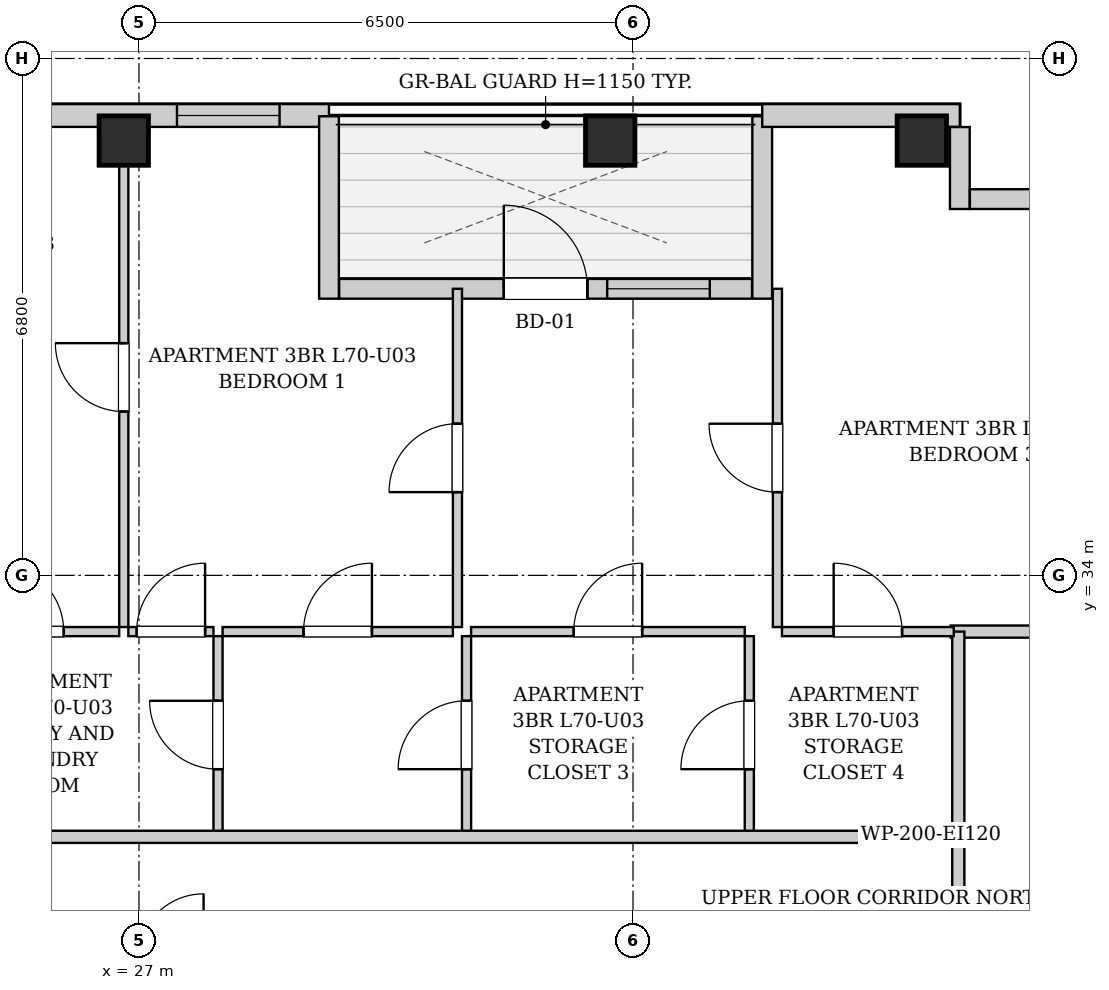
"""IFC4 building model, lengths in metres.
Left out: names, types, materials, properties, quantities, classifications, styles, units other than length and angle.
Written with IfcOpenShell. Run it as: python <this file> out.ifc"""

import sys

from ifc_helpers import new_model, si_unit, direction, frame, frame_2d, origin, origin_2d, place, context, subcontext, project, spatial, rectangle, extrude, element, fill, save


model = new_model("IFC4")
c1 = context("Model", 3, precision=1e-05, world=origin(), true_north=direction((0.0, 1.0)))
c2 = subcontext(c1, "Body", "Model", "MODEL_VIEW")
j1 = project(units=[si_unit("LENGTHUNIT", "METRE"), si_unit("PLANEANGLEUNIT", "RADIAN")], contexts=[c1])
p1 = place(None, origin())
s1 = spatial("IfcSite", under=j1, at=p1, CompositionType="ELEMENT")
p2 = place(p1, origin())
s2 = spatial("IfcBuilding", under=s1, at=p2, CompositionType="ELEMENT")
p3 = place(p2, frame((0.0, 0.0, 241.1)))
s3 = spatial("IfcBuildingStorey", under=s2, at=p3, CompositionType="ELEMENT", Elevation=241.1)
for number, where, z_axis, x_axis in (
    (1, (26.8, 39.72, 0.0), (0.0, 0.0, 1.0), (1.0, 0.0, 0.0)),
    (2, (33.2, 39.72, 0.0), (0.0, 0.0, 1.0), (1.0, 0.0, 0.0)),
    (3, (37.3, 39.72, 0.0), (0.0, 0.0, 1.0), (1.0, 0.0, 0.0)),
):
    element("IfcColumn", number, at=place(p3, frame(where, z_axis=z_axis, x_axis=x_axis)), inside=s3, PredefinedType="COLUMN", context=c2, shape_type="SweptSolid", body=[
        extrude(rectangle(XDim=0.65, YDim=0.65, at=origin_2d()), origin(), (0.0, 0.0, 1.0), 3.4),
    ])
p4 = place(p3, frame((13.1, 40.05, 0.0), z_axis=(0.0, 0.0, 1.0), x_axis=(1.0, 0.0, 0.0)))
e4 = element("IfcWall", 4, at=p4, inside=s3, PredefinedType="SOLIDWALL", context=c2, shape_type="SweptSolid", body=[
    extrude(rectangle(XDim=16.4, YDim=0.3, at=frame_2d((8.2, 0.0))), origin(), (0.0, 0.0, 1.0), 3.14),
])
p5 = place(p4, frame((1.808, 0.0, 0.55)))
e5 = element("IfcOpeningElement", 5, at=p5, cuts=e4, PredefinedType="OPENING", context=c2, shape_type="SweptSolid", body=[
    extrude(rectangle(XDim=1.35, YDim=1.2, at=frame_2d((0.675, 0.6))), frame((0.0, 0.16, 0.0), z_axis=(0.0, -1.0, 0.0), x_axis=(1.0, 0.0, 0.0)), (0.0, 0.0, 1.0), 0.32),
])
p6 = place(p4, frame((6.246, 0.0, 0.55)))
e6 = element("IfcOpeningElement", 6, at=p6, cuts=e4, PredefinedType="OPENING", context=c2, shape_type="SweptSolid", body=[
    extrude(rectangle(XDim=1.35, YDim=1.2, at=frame_2d((0.675, 0.6))), frame((0.0, 0.16, 0.0), z_axis=(0.0, -1.0, 0.0), x_axis=(1.0, 0.0, 0.0)), (0.0, 0.0, 1.0), 0.32),
])
p7 = place(p4, frame((14.4, 0.0, 0.55)))
e7 = element("IfcOpeningElement", 7, at=p7, cuts=e4, PredefinedType="OPENING", context=c2, shape_type="SweptSolid", body=[
    extrude(rectangle(XDim=1.35, YDim=1.2, at=frame_2d((0.675, 0.6))), frame((0.0, 0.16, 0.0), z_axis=(0.0, -1.0, 0.0), x_axis=(1.0, 0.0, 0.0)), (0.0, 0.0, 1.0), 0.32),
])
p8 = place(p3, frame((29.5, 40.04, 0.0), z_axis=(0.0, 0.0, 1.0), x_axis=(0.0, -1.0, 0.0)))
e8 = element("IfcWall", 8, at=p8, inside=s3, PredefinedType="SOLIDWALL", context=c2, shape_type="SweptSolid", body=[
    extrude(rectangle(XDim=2.4, YDim=0.26, at=frame_2d((1.2, 0.0))), origin(), (0.0, 0.0, 1.0), 3.14),
])
p9 = place(p3, frame((29.634, 37.77, 0.0), z_axis=(0.0, 0.0, 1.0), x_axis=(1.0, 0.0, 0.0)))
e9 = element("IfcWall", 9, at=p9, inside=s3, PredefinedType="SOLIDWALL", context=c2, shape_type="SweptSolid", body=[
    extrude(rectangle(XDim=5.432, YDim=0.26, at=frame_2d((2.716, 0.0))), origin(), (0.0, 0.0, 1.0), 3.14),
])
p10 = place(p9, frame((2.166, 0.0, 0.0)))
e10 = element("IfcOpeningElement", 10, at=p10, cuts=e9, PredefinedType="OPENING", context=c2, shape_type="SweptSolid", body=[
    extrude(rectangle(XDim=1.1, YDim=2.0, at=frame_2d((0.55, 1.0))), frame((0.0, 0.14, 0.0), z_axis=(0.0, -1.0, 0.0), x_axis=(1.0, 0.0, 0.0)), (0.0, 0.0, 1.0), 0.28),
])
p11 = place(p9, frame((3.526, 0.0, 0.55)))
e11 = element("IfcOpeningElement", 11, at=p11, cuts=e9, PredefinedType="OPENING", context=c2, shape_type="SweptSolid", body=[
    extrude(rectangle(XDim=1.35, YDim=1.2, at=frame_2d((0.675, 0.6))), frame((0.0, 0.14, 0.0), z_axis=(0.0, -1.0, 0.0), x_axis=(1.0, 0.0, 0.0)), (0.0, 0.0, 1.0), 0.28),
])
p12 = place(p3, frame((35.2, 37.64, 0.0), z_axis=(0.0, 0.0, 1.0), x_axis=(0.0, 1.0, 0.0)))
e12 = element("IfcWall", 12, at=p12, inside=s3, PredefinedType="SOLIDWALL", context=c2, shape_type="SweptSolid", body=[
    extrude(rectangle(XDim=2.4, YDim=0.26, at=frame_2d((1.2, 0.0))), origin(), (0.0, 0.0, 1.0), 3.14),
])
p13 = place(p3, frame((35.2, 40.05, 0.0), z_axis=(0.0, 0.0, 1.0), x_axis=(1.0, 0.0, 0.0)))
e13 = element("IfcWall", 13, at=p13, inside=s3, PredefinedType="SOLIDWALL", context=c2, shape_type="SweptSolid", body=[
    extrude(rectangle(XDim=2.6, YDim=0.3, at=frame_2d((1.3, 0.0))), origin(), (0.0, 0.0, 1.0), 3.14),
])
p14 = place(p3, frame((37.8, 39.898, 0.0), z_axis=(0.0, 0.0, 1.0), x_axis=(0.0, -1.0, 0.0)))
e14 = element("IfcWall", 14, at=p14, inside=s3, PredefinedType="SOLIDWALL", context=c2, shape_type="SweptSolid", body=[
    extrude(rectangle(XDim=1.078, YDim=0.26, at=frame_2d((0.539, 0.0))), origin(), (0.0, 0.0, 1.0), 3.14),
])
p15 = place(p3, frame((37.932, 38.95, 0.0), z_axis=(0.0, 0.0, 1.0), x_axis=(1.0, 0.0, 0.0)))
e15 = element("IfcWall", 15, at=p15, inside=s3, PredefinedType="SOLIDWALL", context=c2, shape_type="SweptSolid", body=[
    extrude(rectangle(XDim=1.248, YDim=0.26, at=frame_2d((0.624, 0.0))), origin(), (0.0, 0.0, 1.0), 3.14),
])
p16 = place(p3, frame((37.78, 28.98, 0.0), z_axis=(0.0, 0.0, 1.0), x_axis=(0.0, 1.0, 0.0)))
e16 = element("IfcWall", 16, at=p16, inside=s3, PredefinedType="PARTITIONING", context=c2, shape_type="SweptSolid", body=[
    extrude(rectangle(XDim=1.58, YDim=0.16, at=frame_2d((0.79, 0.0))), origin(), (0.0, 0.0, 1.0), 3.14),
])
p17 = place(p3, frame((37.68, 33.26, 0.0), z_axis=(0.0, 0.0, 1.0), x_axis=(1.0, 0.0, 0.0)))
e17 = element("IfcWall", 17, at=p17, inside=s3, PredefinedType="PARTITIONING", context=c2, shape_type="SweptSolid", body=[
    extrude(rectangle(XDim=2.34, YDim=0.16, at=frame_2d((1.17, 0.0))), origin(), (0.0, 0.0, 1.0), 3.14),
])
p18 = place(p3, frame((37.78, 30.6, 0.0), z_axis=(0.0, 0.0, 1.0), x_axis=(0.0, 1.0, 0.0)))
e18 = element("IfcWall", 18, at=p18, inside=s3, PredefinedType="PARTITIONING", context=c2, shape_type="SweptSolid", body=[
    extrude(rectangle(XDim=2.66, YDim=0.16, at=frame_2d((1.33, 0.0))), origin(), (0.0, 0.0, 1.0), 3.14),
])
p19 = place(p3, frame((28.04, 30.6, 0.0), z_axis=(0.0, 0.0, 1.0), x_axis=(0.0, 1.0, 0.0)))
e19 = element("IfcWall", 19, at=p19, inside=s3, PredefinedType="PARTITIONING", context=c2, shape_type="SweptSolid", body=[
    extrude(rectangle(XDim=2.6, YDim=0.12, at=frame_2d((1.3, 0.0))), origin(), (0.0, 0.0, 1.0), 3.14),
])
p20 = place(p19, frame((0.85, 0.0, 0.0)))
e20 = element("IfcOpeningElement", 20, at=p20, cuts=e19, PredefinedType="OPENING", context=c2, shape_type="SweptSolid", body=[
    extrude(rectangle(XDim=0.9, YDim=2.05, at=frame_2d((0.45, 1.025))), frame((0.0, 0.07, 0.0), z_axis=(0.0, -1.0, 0.0), x_axis=(1.0, 0.0, 0.0)), (0.0, 0.0, 1.0), 0.14),
])
p21 = place(p3, frame((24.38, 33.26, 0.0), z_axis=(0.0, 0.0, 1.0), x_axis=(1.0, 0.0, 0.0)))
e21 = element("IfcWall", 21, at=p21, inside=s3, PredefinedType="PARTITIONING", context=c2, shape_type="SweptSolid", body=[
    extrude(rectangle(XDim=2.36, YDim=0.12, at=frame_2d((1.18, 0.0))), origin(), (0.0, 0.0, 1.0), 3.14),
])
p22 = place(p21, frame((0.73, 0.0, 0.0)))
e22 = element("IfcOpeningElement", 22, at=p22, cuts=e21, PredefinedType="OPENING", context=c2, shape_type="SweptSolid", body=[
    extrude(rectangle(XDim=0.9, YDim=2.05, at=frame_2d((0.45, 1.025))), frame((0.0, 0.07, 0.0), z_axis=(0.0, -1.0, 0.0), x_axis=(1.0, 0.0, 0.0)), (0.0, 0.0, 1.0), 0.14),
])
p23 = place(p3, frame((26.86, 33.26, 0.0), z_axis=(0.0, 0.0, 1.0), x_axis=(1.0, 0.0, 0.0)))
e23 = element("IfcWall", 23, at=p23, inside=s3, PredefinedType="PARTITIONING", context=c2, shape_type="SweptSolid", body=[
    extrude(rectangle(XDim=1.12, YDim=0.12, at=frame_2d((0.56, 0.0))), origin(), (0.0, 0.0, 1.0), 3.14),
])
p24 = place(p23, frame((0.11, 0.0, 0.0)))
e24 = element("IfcOpeningElement", 24, at=p24, cuts=e23, PredefinedType="OPENING", context=c2, shape_type="SweptSolid", body=[
    extrude(rectangle(XDim=0.9, YDim=2.05, at=frame_2d((0.45, 1.025))), frame((0.0, 0.07, 0.0), z_axis=(0.0, -1.0, 0.0), x_axis=(1.0, 0.0, 0.0)), (0.0, 0.0, 1.0), 0.14),
])
p25 = place(p3, frame((31.31, 30.6, 0.0), z_axis=(0.0, 0.0, 1.0), x_axis=(0.0, 1.0, 0.0)))
e25 = element("IfcWall", 25, at=p25, inside=s3, PredefinedType="PARTITIONING", context=c2, shape_type="SweptSolid", body=[
    extrude(rectangle(XDim=2.6, YDim=0.12, at=frame_2d((1.3, 0.0))), origin(), (0.0, 0.0, 1.0), 3.14),
])
p26 = place(p25, frame((0.85, 0.0, 0.0)))
e26 = element("IfcOpeningElement", 26, at=p26, cuts=e25, PredefinedType="OPENING", context=c2, shape_type="SweptSolid", body=[
    extrude(rectangle(XDim=0.9, YDim=2.05, at=frame_2d((0.45, 1.025))), frame((0.0, 0.07, 0.0), z_axis=(0.0, -1.0, 0.0), x_axis=(1.0, 0.0, 0.0)), (0.0, 0.0, 1.0), 0.14),
])
p27 = place(p3, frame((28.1, 33.26, 0.0), z_axis=(0.0, 0.0, 1.0), x_axis=(1.0, 0.0, 0.0)))
e27 = element("IfcWall", 27, at=p27, inside=s3, PredefinedType="PARTITIONING", context=c2, shape_type="SweptSolid", body=[
    extrude(rectangle(XDim=3.03, YDim=0.12, at=frame_2d((1.515, 0.0))), origin(), (0.0, 0.0, 1.0), 3.14),
])
p28 = place(p27, frame((1.065, 0.0, 0.0)))
e28 = element("IfcOpeningElement", 28, at=p28, cuts=e27, PredefinedType="OPENING", context=c2, shape_type="SweptSolid", body=[
    extrude(rectangle(XDim=0.9, YDim=2.05, at=frame_2d((0.45, 1.025))), frame((0.0, 0.07, 0.0), z_axis=(0.0, -1.0, 0.0), x_axis=(1.0, 0.0, 0.0)), (0.0, 0.0, 1.0), 0.14),
])
p29 = place(p3, frame((35.03, 30.6, 0.0), z_axis=(0.0, 0.0, 1.0), x_axis=(0.0, 1.0, 0.0)))
e29 = element("IfcWall", 29, at=p29, inside=s3, PredefinedType="PARTITIONING", context=c2, shape_type="SweptSolid", body=[
    extrude(rectangle(XDim=2.6, YDim=0.12, at=frame_2d((1.3, 0.0))), origin(), (0.0, 0.0, 1.0), 3.14),
])
p30 = place(p29, frame((0.85, 0.0, 0.0)))
e30 = element("IfcOpeningElement", 30, at=p30, cuts=e29, PredefinedType="OPENING", context=c2, shape_type="SweptSolid", body=[
    extrude(rectangle(XDim=0.9, YDim=2.05, at=frame_2d((0.45, 1.025))), frame((0.0, 0.07, 0.0), z_axis=(0.0, -1.0, 0.0), x_axis=(1.0, 0.0, 0.0)), (0.0, 0.0, 1.0), 0.14),
])
p31 = place(p3, frame((31.37, 33.26, 0.0), z_axis=(0.0, 0.0, 1.0), x_axis=(1.0, 0.0, 0.0)))
e31 = element("IfcWall", 31, at=p31, inside=s3, PredefinedType="PARTITIONING", context=c2, shape_type="SweptSolid", body=[
    extrude(rectangle(XDim=3.6, YDim=0.12, at=frame_2d((1.8, 0.0))), origin(), (0.0, 0.0, 1.0), 3.14),
])
p32 = place(p31, frame((1.35, 0.0, 0.0)))
e32 = element("IfcOpeningElement", 32, at=p32, cuts=e31, PredefinedType="OPENING", context=c2, shape_type="SweptSolid", body=[
    extrude(rectangle(XDim=0.9, YDim=2.05, at=frame_2d((0.45, 1.025))), frame((0.0, 0.07, 0.0), z_axis=(0.0, -1.0, 0.0), x_axis=(1.0, 0.0, 0.0)), (0.0, 0.0, 1.0), 0.14),
])
p33 = place(p3, frame((35.46, 33.26, 0.0), z_axis=(0.0, 0.0, 1.0), x_axis=(1.0, 0.0, 0.0)))
e33 = element("IfcWall", 33, at=p33, inside=s3, PredefinedType="PARTITIONING", context=c2, shape_type="SweptSolid", body=[
    extrude(rectangle(XDim=2.26, YDim=0.12, at=frame_2d((1.13, 0.0))), origin(), (0.0, 0.0, 1.0), 3.14),
])
p34 = place(p33, frame((0.68, 0.0, 0.0)))
e34 = element("IfcOpeningElement", 34, at=p34, cuts=e33, PredefinedType="OPENING", context=c2, shape_type="SweptSolid", body=[
    extrude(rectangle(XDim=0.9, YDim=2.05, at=frame_2d((0.45, 1.025))), frame((0.0, 0.07, 0.0), z_axis=(0.0, -1.0, 0.0), x_axis=(1.0, 0.0, 0.0)), (0.0, 0.0, 1.0), 0.14),
])
p35 = place(p3, frame((26.8, 33.32, 0.0), z_axis=(0.0, 0.0, 1.0), x_axis=(0.0, 1.0, 0.0)))
e35 = element("IfcWall", 35, at=p35, inside=s3, PredefinedType="PARTITIONING", context=c2, shape_type="SweptSolid", body=[
    extrude(rectangle(XDim=6.6, YDim=0.12, at=frame_2d((3.3, 0.0))), origin(), (0.0, 0.0, 1.0), 3.14),
])
p36 = place(p35, frame((2.835, 0.0, 0.0)))
e36 = element("IfcOpeningElement", 36, at=p36, cuts=e35, PredefinedType="OPENING", context=c2, shape_type="SweptSolid", body=[
    extrude(rectangle(XDim=0.9, YDim=2.05, at=frame_2d((0.45, 1.025))), frame((0.0, 0.07, 0.0), z_axis=(0.0, -1.0, 0.0), x_axis=(1.0, 0.0, 0.0)), (0.0, 0.0, 1.0), 0.14),
])
p37 = place(p3, frame((31.19, 33.32, 0.0), z_axis=(0.0, 0.0, 1.0), x_axis=(0.0, 1.0, 0.0)))
e37 = element("IfcWall", 37, at=p37, inside=s3, PredefinedType="PARTITIONING", context=c2, shape_type="SweptSolid", body=[
    extrude(rectangle(XDim=4.45, YDim=0.12, at=frame_2d((2.225, 0.0))), origin(), (0.0, 0.0, 1.0), 3.14),
])
p38 = place(p37, frame((1.775, 0.0, 0.0)))
e38 = element("IfcOpeningElement", 38, at=p38, cuts=e37, PredefinedType="OPENING", context=c2, shape_type="SweptSolid", body=[
    extrude(rectangle(XDim=0.9, YDim=2.05, at=frame_2d((0.45, 1.025))), frame((0.0, 0.07, 0.0), z_axis=(0.0, -1.0, 0.0), x_axis=(1.0, 0.0, 0.0)), (0.0, 0.0, 1.0), 0.14),
])
p39 = place(p3, frame((35.4, 33.32, 0.0), z_axis=(0.0, 0.0, 1.0), x_axis=(0.0, 1.0, 0.0)))
e39 = element("IfcWall", 39, at=p39, inside=s3, PredefinedType="PARTITIONING", context=c2, shape_type="SweptSolid", body=[
    extrude(rectangle(XDim=4.45, YDim=0.12, at=frame_2d((2.225, 0.0))), origin(), (0.0, 0.0, 1.0), 3.14),
])
p40 = place(p39, frame((1.775, 0.0, 0.0)))
e40 = element("IfcOpeningElement", 40, at=p40, cuts=e39, PredefinedType="OPENING", context=c2, shape_type="SweptSolid", body=[
    extrude(rectangle(XDim=0.9, YDim=2.05, at=frame_2d((0.45, 1.025))), frame((0.0, 0.07, 0.0), z_axis=(0.0, -1.0, 0.0), x_axis=(1.0, 0.0, 0.0)), (0.0, 0.0, 1.0), 0.14),
])
p41 = place(p3, frame((13.15, 30.56, 0.0), z_axis=(0.0, 0.0, 1.0), x_axis=(1.0, 0.0, 0.0)))
e41 = element("IfcWall", 41, at=p41, inside=s3, PredefinedType="PARTITIONING", context=c2, shape_type="SweptSolid", body=[
    extrude(rectangle(XDim=24.6, YDim=0.16, at=frame_2d((12.3, 0.0))), origin(), (0.0, 0.0, 1.0), 3.14),
])
p42 = place(p41, frame((3.165, 0.0, 0.0)))
e42 = element("IfcOpeningElement", 42, at=p42, cuts=e41, PredefinedType="OPENING", context=c2, shape_type="SweptSolid", body=[
    extrude(rectangle(XDim=0.95, YDim=2.1, at=frame_2d((0.475, 1.05))), frame((0.0, 0.09, 0.0), z_axis=(0.0, -1.0, 0.0), x_axis=(1.0, 0.0, 0.0)), (0.0, 0.0, 1.0), 0.18),
])
p43 = place(p20, origin())
e43 = element("IfcDoor", 43, at=p43, inside=s3, OperationType="SINGLE_SWING_RIGHT", PredefinedType="DOOR", context=c2, shape_type="SweptSolid", body=[
    extrude(rectangle(XDim=0.9, YDim=2.05, at=frame_2d((0.45, 1.025))), frame((0.0, 0.025, 0.0), z_axis=(0.0, -1.0, 0.0), x_axis=(1.0, 0.0, 0.0)), (0.0, 0.0, 1.0), 0.05),
])
fill(e20, e43)
p44 = place(p22, origin())
e44 = element("IfcDoor", 44, at=p44, inside=s3, OperationType="SINGLE_SWING_LEFT", PredefinedType="DOOR", context=c2, shape_type="SweptSolid", body=[
    extrude(rectangle(XDim=0.9, YDim=2.05, at=frame_2d((0.45, 1.025))), frame((0.0, 0.025, 0.0), z_axis=(0.0, -1.0, 0.0), x_axis=(1.0, 0.0, 0.0)), (0.0, 0.0, 1.0), 0.05),
])
fill(e22, e44)
p45 = place(p24, origin())
e45 = element("IfcDoor", 45, at=p45, inside=s3, OperationType="SINGLE_SWING_RIGHT", PredefinedType="DOOR", context=c2, shape_type="SweptSolid", body=[
    extrude(rectangle(XDim=0.9, YDim=2.05, at=frame_2d((0.45, 1.025))), frame((0.0, 0.025, 0.0), z_axis=(0.0, -1.0, 0.0), x_axis=(1.0, 0.0, 0.0)), (0.0, 0.0, 1.0), 0.05),
])
fill(e24, e45)
p46 = place(p26, origin())
e46 = element("IfcDoor", 46, at=p46, inside=s3, OperationType="SINGLE_SWING_LEFT", PredefinedType="DOOR", context=c2, shape_type="SweptSolid", body=[
    extrude(rectangle(XDim=0.9, YDim=2.05, at=frame_2d((0.45, 1.025))), frame((0.0, 0.025, 0.0), z_axis=(0.0, -1.0, 0.0), x_axis=(1.0, 0.0, 0.0)), (0.0, 0.0, 1.0), 0.05),
])
fill(e26, e46)
p47 = place(p28, origin())
e47 = element("IfcDoor", 47, at=p47, inside=s3, OperationType="SINGLE_SWING_RIGHT", PredefinedType="DOOR", context=c2, shape_type="SweptSolid", body=[
    extrude(rectangle(XDim=0.9, YDim=2.05, at=frame_2d((0.45, 1.025))), frame((0.0, 0.025, 0.0), z_axis=(0.0, -1.0, 0.0), x_axis=(1.0, 0.0, 0.0)), (0.0, 0.0, 1.0), 0.05),
])
fill(e28, e47)
p48 = place(p30, origin())
e48 = element("IfcDoor", 48, at=p48, inside=s3, OperationType="SINGLE_SWING_LEFT", PredefinedType="DOOR", context=c2, shape_type="SweptSolid", body=[
    extrude(rectangle(XDim=0.9, YDim=2.05, at=frame_2d((0.45, 1.025))), frame((0.0, 0.025, 0.0), z_axis=(0.0, -1.0, 0.0), x_axis=(1.0, 0.0, 0.0)), (0.0, 0.0, 1.0), 0.05),
])
fill(e30, e48)
p49 = place(p32, origin())
e49 = element("IfcDoor", 49, at=p49, inside=s3, OperationType="SINGLE_SWING_RIGHT", PredefinedType="DOOR", context=c2, shape_type="SweptSolid", body=[
    extrude(rectangle(XDim=0.9, YDim=2.05, at=frame_2d((0.45, 1.025))), frame((0.0, 0.025, 0.0), z_axis=(0.0, -1.0, 0.0), x_axis=(1.0, 0.0, 0.0)), (0.0, 0.0, 1.0), 0.05),
])
fill(e32, e49)
p50 = place(p34, origin())
e50 = element("IfcDoor", 50, at=p50, inside=s3, OperationType="SINGLE_SWING_LEFT", PredefinedType="DOOR", context=c2, shape_type="SweptSolid", body=[
    extrude(rectangle(XDim=0.9, YDim=2.05, at=frame_2d((0.45, 1.025))), frame((0.0, 0.025, 0.0), z_axis=(0.0, -1.0, 0.0), x_axis=(1.0, 0.0, 0.0)), (0.0, 0.0, 1.0), 0.05),
])
fill(e34, e50)
p51 = place(p36, origin())
e51 = element("IfcDoor", 51, at=p51, inside=s3, OperationType="SINGLE_SWING_RIGHT", PredefinedType="DOOR", context=c2, shape_type="SweptSolid", body=[
    extrude(rectangle(XDim=0.9, YDim=2.05, at=frame_2d((0.45, 1.025))), frame((0.0, 0.025, 0.0), z_axis=(0.0, -1.0, 0.0), x_axis=(1.0, 0.0, 0.0)), (0.0, 0.0, 1.0), 0.05),
])
fill(e36, e51)
p52 = place(p38, origin())
e52 = element("IfcDoor", 52, at=p52, inside=s3, OperationType="SINGLE_SWING_LEFT", PredefinedType="DOOR", context=c2, shape_type="SweptSolid", body=[
    extrude(rectangle(XDim=0.9, YDim=2.05, at=frame_2d((0.45, 1.025))), frame((0.0, 0.025, 0.0), z_axis=(0.0, -1.0, 0.0), x_axis=(1.0, 0.0, 0.0)), (0.0, 0.0, 1.0), 0.05),
])
fill(e38, e52)
p53 = place(p40, origin())
e53 = element("IfcDoor", 53, at=p53, inside=s3, OperationType="SINGLE_SWING_RIGHT", PredefinedType="DOOR", context=c2, shape_type="SweptSolid", body=[
    extrude(rectangle(XDim=0.9, YDim=2.05, at=frame_2d((0.45, 1.025))), frame((0.0, 0.025, 0.0), z_axis=(0.0, -1.0, 0.0), x_axis=(1.0, 0.0, 0.0)), (0.0, 0.0, 1.0), 0.05),
])
fill(e40, e53)
p54 = place(p10, origin())
e54 = element("IfcDoor", 54, at=p54, inside=s3, OperationType="SINGLE_SWING_LEFT", PredefinedType="DOOR", context=c2, shape_type="SweptSolid", body=[
    extrude(rectangle(XDim=1.1, YDim=2.0, at=frame_2d((0.55, 1.0))), frame((0.0, 0.025, 0.0), z_axis=(0.0, -1.0, 0.0), x_axis=(1.0, 0.0, 0.0)), (0.0, 0.0, 1.0), 0.05),
])
fill(e10, e54)
p55 = place(p7, origin())
e55 = element("IfcWindow", 55, at=p55, inside=s3, PartitioningType="SINGLE_PANEL", PredefinedType="WINDOW", context=c2, shape_type="SweptSolid", body=[
    extrude(rectangle(XDim=1.35, YDim=1.2, at=frame_2d((0.675, 0.6))), frame((0.0, 0.03, 0.0), z_axis=(0.0, -1.0, 0.0), x_axis=(1.0, 0.0, 0.0)), (0.0, 0.0, 1.0), 0.06),
])
fill(e7, e55)
p56 = place(p11, origin())
e56 = element("IfcWindow", 56, at=p56, inside=s3, PartitioningType="SINGLE_PANEL", PredefinedType="WINDOW", context=c2, shape_type="SweptSolid", body=[
    extrude(rectangle(XDim=1.35, YDim=1.2, at=frame_2d((0.675, 0.6))), frame((0.0, 0.03, 0.0), z_axis=(0.0, -1.0, 0.0), x_axis=(1.0, 0.0, 0.0)), (0.0, 0.0, 1.0), 0.06),
])
fill(e11, e56)
save(model, sys.argv[1])
